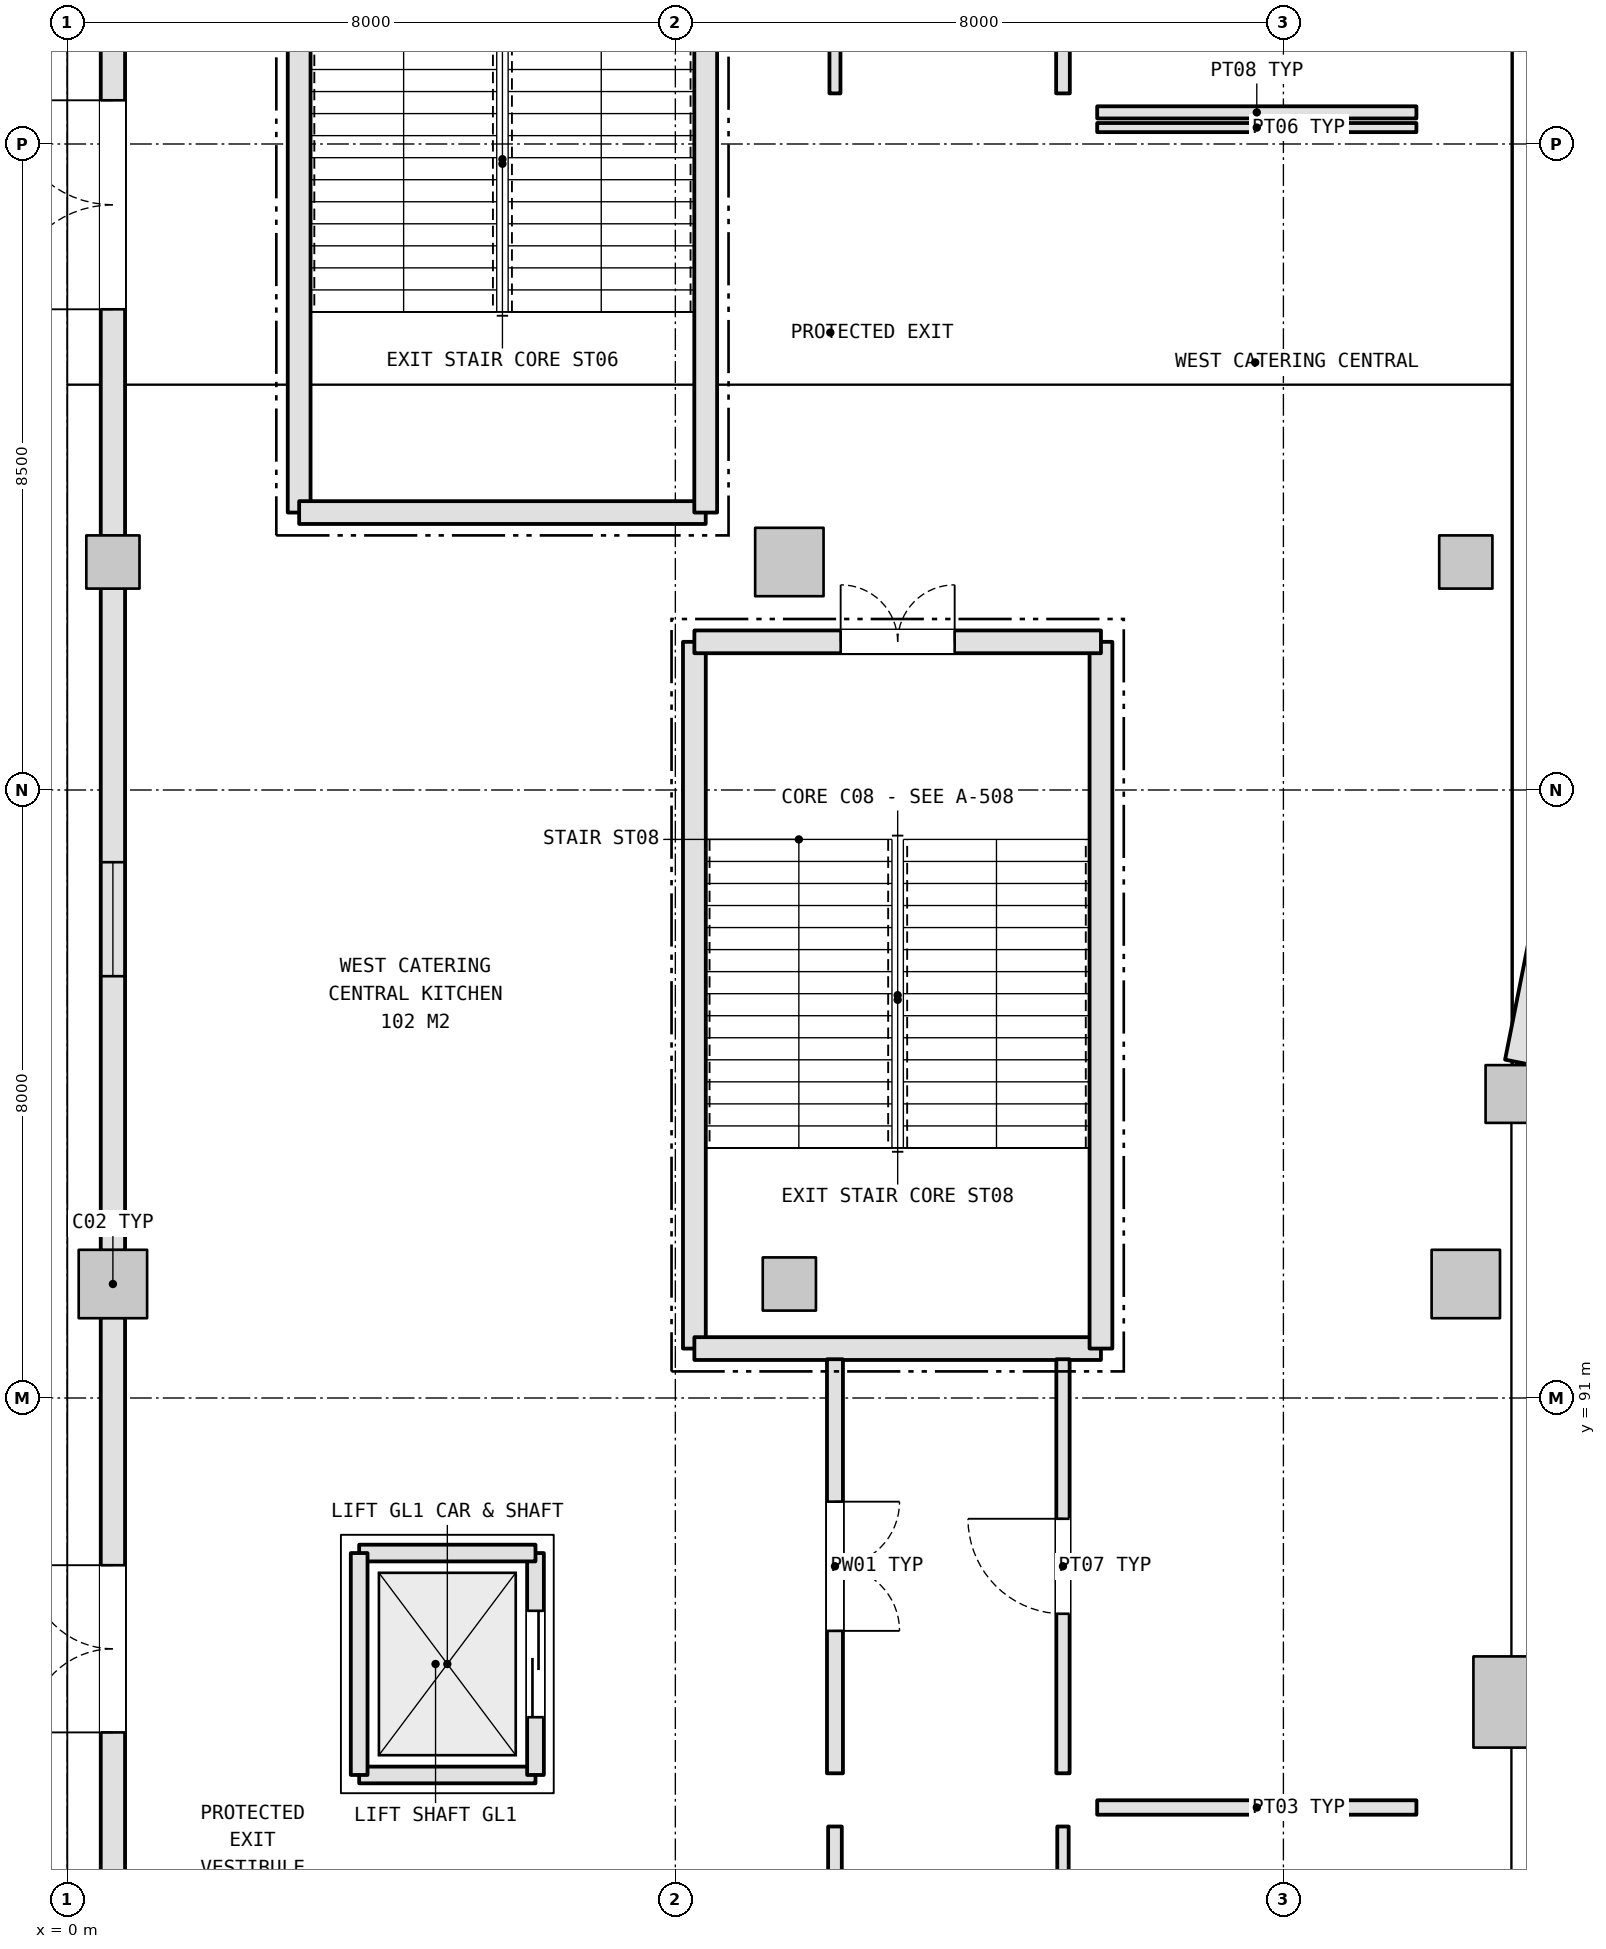
"""IFC4 building model, lengths in metres.
Left out: names, types, materials, properties, quantities, classifications, styles, units other than length and angle.
Written with IfcOpenShell. Run it as: python <this file> out.ifc"""

import sys

from ifc_helpers import new_model, si_unit, direction, frame, frame_2d, origin, origin_2d, place, context, subcontext, project, spatial, rectangle, extrude, element, fill, save


model = new_model("IFC4")
c1 = context("Model", 3, precision=1e-05, world=origin(), true_north=direction((0.0, 1.0)))
c2 = subcontext(c1, "Body", "Model", "MODEL_VIEW")
j1 = project(units=[si_unit("LENGTHUNIT", "METRE"), si_unit("PLANEANGLEUNIT", "RADIAN")], contexts=[c1])
p1 = place(None, origin())
s1 = spatial("IfcSite", under=j1, at=p1, CompositionType="ELEMENT")
p2 = place(p1, origin())
s2 = spatial("IfcBuilding", under=s1, at=p2, CompositionType="ELEMENT")
p3 = place(p2, origin())
s3 = spatial("IfcBuildingStorey", under=s2, at=p3, CompositionType="ELEMENT", Elevation=0.0)
p4 = place(p3, frame((19.0, 95.0, 0.0), z_axis=(0.0, 0.0, 1.0), x_axis=(1.0, 0.0, 0.0)))
e1 = element("IfcColumn", 1, at=p4, inside=s3, PredefinedType="COLUMN", context=c2, shape_type="SweptSolid", body=[
    extrude(rectangle(XDim=0.68, YDim=0.76, at=origin_2d()), origin(), (0.0, 0.0, 1.0), 5.4),
])
p5 = place(p3, frame((19.0, 87.0, 0.0), z_axis=(0.0, 0.0, 1.0), x_axis=(1.0, 0.0, 0.0)))
e2 = element("IfcColumn", 2, at=p5, inside=s3, PredefinedType="COLUMN", context=c2, shape_type="SweptSolid", body=[
    extrude(rectangle(XDim=1.0, YDim=1.2, at=origin_2d()), origin(), (0.0, 0.0, 1.0), 5.4),
])
p6 = place(p3, frame((0.6, 92.5, 0.0), z_axis=(0.0, 0.0, 1.0), x_axis=(1.0, 0.0, 0.0)))
e3 = element("IfcColumn", 3, at=p6, inside=s3, PredefinedType="COLUMN", context=c2, shape_type="SweptSolid", body=[
    extrude(rectangle(XDim=0.9, YDim=0.9, at=origin_2d()), origin(), (0.0, 0.0, 1.0), 5.4),
])
for number, where, z_axis, x_axis in (
    (4, (0.6, 102.0, 0.0), (0.0, 0.0, 1.0), (1.0, 0.0, 0.0)),
    (5, (9.5, 92.5, 0.0), (0.0, 0.0, 1.0), (1.0, 0.0, 0.0)),
):
    element("IfcColumn", number, at=place(p3, frame(where, z_axis=z_axis, x_axis=x_axis)), inside=s3, PredefinedType="COLUMN", context=c2, shape_type="SweptSolid", body=[
        extrude(rectangle(XDim=0.7, YDim=0.7, at=origin_2d()), origin(), (0.0, 0.0, 1.0), 5.4),
    ])
for number, where, z_axis, x_axis in (
    (6, (9.5, 102.0, 0.0), (0.0, 0.0, 1.0), (1.0, 0.0, 0.0)),
    (7, (18.4, 92.5, 0.0), (0.0, 0.0, 1.0), (1.0, 0.0, 0.0)),
):
    element("IfcColumn", number, at=place(p3, frame(where, z_axis=z_axis, x_axis=x_axis)), inside=s3, PredefinedType="COLUMN", context=c2, shape_type="SweptSolid", body=[
        extrude(rectangle(XDim=0.9, YDim=0.9, at=origin_2d()), origin(), (0.0, 0.0, 1.0), 5.4),
    ])
p7 = place(p3, frame((18.4, 102.0, 0.0), z_axis=(0.0, 0.0, 1.0), x_axis=(1.0, 0.0, 0.0)))
e8 = element("IfcColumn", 8, at=p7, inside=s3, PredefinedType="COLUMN", context=c2, shape_type="SweptSolid", body=[
    extrude(rectangle(XDim=0.7, YDim=0.7, at=origin_2d()), origin(), (0.0, 0.0, 1.0), 5.4),
])
p8 = place(p3, frame((22.827, 114.239, 0.0), z_axis=(0.0, 0.0, 1.0), x_axis=(-0.19509817024, -0.980783719262, 0.0)))
e9 = element("IfcWall", 9, at=p8, inside=s3, PredefinedType="SOLIDWALL", context=c2, shape_type="SweptSolid", body=[
    extrude(rectangle(XDim=19.188, YDim=0.34, at=frame_2d((9.594, 0.0))), origin(), (0.0, 0.0, 1.0), 4.275),
])
p9 = place(p8, frame((8.794, 0.0, 2.4)))
e10 = element("IfcOpeningElement", 10, at=p9, cuts=e9, PredefinedType="OPENING", context=c2, shape_type="SweptSolid", body=[
    extrude(rectangle(XDim=1.6, YDim=1.2, at=frame_2d((0.8, 0.6))), frame((0.0, 0.18, 0.0), z_axis=(0.0, -1.0, 0.0), x_axis=(1.0, 0.0, 0.0)), (0.0, 0.0, 1.0), 0.36),
])
p10 = place(p3, frame((0.6, 83.338, 0.0), z_axis=(0.0, 0.0, 1.0), x_axis=(0.0, 1.0, 0.0)))
e11 = element("IfcWall", 11, at=p10, inside=s3, PredefinedType="SOLIDWALL", context=c2, shape_type="SweptSolid", body=[
    extrude(rectangle(XDim=8.724, YDim=0.32, at=frame_2d((4.362, 0.0))), origin(), (0.0, 0.0, 1.0), 4.475),
])
p11 = place(p10, frame((3.262, 0.0, 0.0)))
e12 = element("IfcOpeningElement", 12, at=p11, cuts=e11, PredefinedType="OPENING", context=c2, shape_type="SweptSolid", body=[
    extrude(rectangle(XDim=2.2, YDim=2.4, at=frame_2d((1.1, 1.2))), frame((0.0, 0.17, 0.0), z_axis=(0.0, -1.0, 0.0), x_axis=(1.0, 0.0, 0.0)), (0.0, 0.0, 1.0), 0.34),
])
p12 = place(p3, frame((0.6, 92.938, 0.0), z_axis=(0.0, 0.0, 1.0), x_axis=(0.0, 1.0, 0.0)))
e13 = element("IfcWall", 13, at=p12, inside=s3, PredefinedType="SOLIDWALL", context=c2, shape_type="SweptSolid", body=[
    extrude(rectangle(XDim=8.724, YDim=0.32, at=frame_2d((4.362, 0.0))), origin(), (0.0, 0.0, 1.0), 4.475),
])
p13 = place(p12, frame((3.612, 0.0, 1.05)))
e14 = element("IfcOpeningElement", 14, at=p13, cuts=e13, PredefinedType="OPENING", context=c2, shape_type="SweptSolid", body=[
    extrude(rectangle(XDim=1.5, YDim=1.5, at=frame_2d((0.75, 0.75))), frame((0.0, 0.17, 0.0), z_axis=(0.0, -1.0, 0.0), x_axis=(1.0, 0.0, 0.0)), (0.0, 0.0, 1.0), 0.34),
])
p14 = place(p3, frame((0.6, 102.338, 0.0), z_axis=(0.0, 0.0, 1.0), x_axis=(0.0, 1.0, 0.0)))
e15 = element("IfcWall", 15, at=p14, inside=s3, PredefinedType="SOLIDWALL", context=c2, shape_type="SweptSolid", body=[
    extrude(rectangle(XDim=8.724, YDim=0.32, at=frame_2d((4.362, 0.0))), origin(), (0.0, 0.0, 1.0), 4.475),
])
p15 = place(p14, frame((2.987, 0.0, 0.0)))
e16 = element("IfcOpeningElement", 16, at=p15, cuts=e15, PredefinedType="OPENING", context=c2, shape_type="SweptSolid", body=[
    extrude(rectangle(XDim=2.75, YDim=2.4, at=frame_2d((1.375, 1.2))), frame((0.0, 0.17, 0.0), z_axis=(0.0, -1.0, 0.0), x_axis=(1.0, 0.0, 0.0)), (0.0, 0.0, 1.0), 0.34),
])
p16 = place(p3, frame((3.05, 111.95, 0.0), z_axis=(0.0, 0.0, 1.0), x_axis=(0.0, -1.0, 0.0)))
e17 = element("IfcWall", 17, at=p16, inside=s3, PredefinedType="SHEAR", context=c2, shape_type="SweptSolid", body=[
    extrude(rectangle(XDim=9.299, YDim=0.3, at=frame_2d((4.65, 0.0))), origin(), (0.0, 0.0, 1.0), 5.14),
])
p17 = place(p3, frame((3.05, 102.65, 0.0), z_axis=(0.0, 0.0, 1.0), x_axis=(1.0, 0.0, 0.0)))
e18 = element("IfcWall", 18, at=p17, inside=s3, PredefinedType="SHEAR", context=c2, shape_type="SweptSolid", body=[
    extrude(rectangle(XDim=5.349, YDim=0.3, at=frame_2d((2.675, 0.0))), origin(), (0.0, 0.0, 1.0), 5.14),
])
for number, where, z_axis, x_axis in (
    (19, (8.4, 102.65, 0.0), (0.0, 0.0, 1.0), (0.0, 1.0, 0.0)),
    (20, (8.25, 100.95, 0.0), (0.0, 0.0, 1.0), (0.0, -1.0, 0.0)),
):
    element("IfcWall", number, at=place(p3, frame(where, z_axis=z_axis, x_axis=x_axis)), inside=s3, PredefinedType="SHEAR", context=c2, shape_type="SweptSolid", body=[
        extrude(rectangle(XDim=9.299, YDim=0.3, at=frame_2d((4.65, 0.0))), origin(), (0.0, 0.0, 1.0), 5.14),
    ])
p18 = place(p3, frame((8.25, 91.65, 0.0), z_axis=(0.0, 0.0, 1.0), x_axis=(1.0, 0.0, 0.0)))
e21 = element("IfcWall", 21, at=p18, inside=s3, PredefinedType="SHEAR", context=c2, shape_type="SweptSolid", body=[
    extrude(rectangle(XDim=5.349, YDim=0.3, at=frame_2d((2.675, 0.0))), origin(), (0.0, 0.0, 1.0), 5.14),
])
p19 = place(p3, frame((13.6, 91.65, 0.0), z_axis=(0.0, 0.0, 1.0), x_axis=(0.0, 1.0, 0.0)))
e22 = element("IfcWall", 22, at=p19, inside=s3, PredefinedType="SHEAR", context=c2, shape_type="SweptSolid", body=[
    extrude(rectangle(XDim=9.299, YDim=0.3, at=frame_2d((4.65, 0.0))), origin(), (0.0, 0.0, 1.0), 5.14),
])
p20 = place(p3, frame((13.6, 100.95, 0.0), z_axis=(0.0, 0.0, 1.0), x_axis=(-1.0, 0.0, 0.0)))
e23 = element("IfcWall", 23, at=p20, inside=s3, PredefinedType="SHEAR", context=c2, shape_type="SweptSolid", body=[
    extrude(rectangle(XDim=5.349, YDim=0.3, at=frame_2d((2.675, 0.0))), origin(), (0.0, 0.0, 1.0), 5.14),
])
p21 = place(p20, frame((1.925, 0.0, 0.0)))
e24 = element("IfcOpeningElement", 24, at=p21, cuts=e23, PredefinedType="OPENING", context=c2, shape_type="SweptSolid", body=[
    extrude(rectangle(XDim=1.5, YDim=2.2, at=frame_2d((0.75, 1.1))), frame((0.0, 0.16, 0.0), z_axis=(0.0, -1.0, 0.0), x_axis=(1.0, 0.0, 0.0)), (0.0, 0.0, 1.0), 0.32),
])
p22 = place(p3, frame((3.84, 86.04, -1.1), z_axis=(0.0, 0.0, 1.0), x_axis=(1.0, 0.0, 0.0)))
e25 = element("IfcWall", 25, at=p22, inside=s3, PredefinedType="SHEAR", context=c2, shape_type="SweptSolid", body=[
    extrude(rectangle(XDim=2.32, YDim=0.22, at=frame_2d((1.16, 0.0))), origin(), (0.0, 0.0, 1.0), 6.24),
])
p23 = place(p3, frame((6.16, 86.04, -1.1), z_axis=(0.0, 0.0, 1.0), x_axis=(0.0, 1.0, 0.0)))
e26 = element("IfcWall", 26, at=p23, inside=s3, PredefinedType="SHEAR", context=c2, shape_type="SweptSolid", body=[
    extrude(rectangle(XDim=2.92, YDim=0.22, at=frame_2d((1.46, 0.0))), origin(), (0.0, 0.0, 1.0), 6.24),
])
p24 = place(p23, frame((0.76, 0.0, 1.1)))
e27 = element("IfcOpeningElement", 27, at=p24, cuts=e26, PredefinedType="OPENING", context=c2, shape_type="SweptSolid", body=[
    extrude(rectangle(XDim=1.4, YDim=2.3, at=frame_2d((0.7, 1.15))), frame((0.0, 0.12, 0.0), z_axis=(0.0, -1.0, 0.0), x_axis=(1.0, 0.0, 0.0)), (0.0, 0.0, 1.0), 0.24),
])
p25 = place(p3, frame((6.16, 88.96, -1.1), z_axis=(0.0, 0.0, 1.0), x_axis=(-1.0, 0.0, 0.0)))
e28 = element("IfcWall", 28, at=p25, inside=s3, PredefinedType="SHEAR", context=c2, shape_type="SweptSolid", body=[
    extrude(rectangle(XDim=2.32, YDim=0.22, at=frame_2d((1.16, 0.0))), origin(), (0.0, 0.0, 1.0), 6.24),
])
p26 = place(p3, frame((3.84, 88.96, -1.1), z_axis=(0.0, 0.0, 1.0), x_axis=(0.0, -1.0, 0.0)))
e29 = element("IfcWall", 29, at=p26, inside=s3, PredefinedType="SHEAR", context=c2, shape_type="SweptSolid", body=[
    extrude(rectangle(XDim=2.92, YDim=0.22, at=frame_2d((1.46, 0.0))), origin(), (0.0, 0.0, 1.0), 6.24),
])
p27 = place(p3, frame((10.1, 85.362, 0.0), z_axis=(0.0, 0.0, 1.0), x_axis=(0.0, -1.0, 0.0)))
e30 = element("IfcWall", 30, at=p27, inside=s3, PredefinedType="PARTITIONING", context=c2, shape_type="SweptSolid", body=[
    extrude(rectangle(XDim=15.376, YDim=0.18, at=frame_2d((7.688, 0.0))), origin(), (0.0, 0.0, 1.0), 4.668),
])
p28 = place(p27, frame((7.213, 0.0, 0.0)))
e31 = element("IfcOpeningElement", 31, at=p28, cuts=e30, PredefinedType="OPENING", context=c2, shape_type="SweptSolid", body=[
    extrude(rectangle(XDim=0.95, YDim=2.15, at=frame_2d((0.475, 1.075))), frame((0.0, 0.1, 0.0), z_axis=(0.0, -1.0, 0.0), x_axis=(1.0, 0.0, 0.0)), (0.0, 0.0, 1.0), 0.2),
])
p29 = place(p3, frame((13.1, 69.986, 0.0), z_axis=(0.0, 0.0, 1.0), x_axis=(0.0, 1.0, 0.0)))
e32 = element("IfcWall", 32, at=p29, inside=s3, PredefinedType="PARTITIONING", context=c2, shape_type="SweptSolid", body=[
    extrude(rectangle(XDim=15.376, YDim=0.15, at=frame_2d((7.688, 0.0))), origin(), (0.0, 0.0, 1.0), 4.668),
])
p30 = place(p29, frame((7.138, 0.0, 0.0)))
e33 = element("IfcOpeningElement", 33, at=p30, cuts=e32, PredefinedType="OPENING", context=c2, shape_type="SweptSolid", body=[
    extrude(rectangle(XDim=1.1, YDim=2.15, at=frame_2d((0.55, 1.075))), frame((0.0, 0.085, 0.0), z_axis=(0.0, -1.0, 0.0), x_axis=(1.0, 0.0, 0.0)), (0.0, 0.0, 1.0), 0.17),
])
p31 = place(p3, frame((13.55, 85.612, 0.0), z_axis=(0.0, 0.0, 1.0), x_axis=(1.0, 0.0, 0.0)))
e34 = element("IfcWall", 34, at=p31, inside=s3, PredefinedType="PARTITIONING", context=c2, shape_type="SweptSolid", body=[
    extrude(rectangle(XDim=4.2, YDim=0.19, at=frame_2d((2.1, 0.0))), origin(), (0.0, 0.0, 1.0), 5.12),
])
p32 = place(p3, frame((10.1, 91.51, 0.0), z_axis=(0.0, 0.0, 1.0), x_axis=(0.0, -1.0, 0.0)))
e35 = element("IfcWall", 35, at=p32, inside=s3, PredefinedType="PLUMBINGWALL", context=c2, shape_type="SweptSolid", body=[
    extrude(rectangle(XDim=5.448, YDim=0.21, at=frame_2d((2.724, 0.0))), origin(), (0.0, 0.0, 1.0), 5.12),
])
p33 = place(p32, frame((1.874, 0.0, 0.0)))
e36 = element("IfcOpeningElement", 36, at=p33, cuts=e35, PredefinedType="OPENING", context=c2, shape_type="SweptSolid", body=[
    extrude(rectangle(XDim=1.7, YDim=2.25, at=frame_2d((0.85, 1.125))), frame((0.0, 0.115, 0.0), z_axis=(0.0, -1.0, 0.0), x_axis=(1.0, 0.0, 0.0)), (0.0, 0.0, 1.0), 0.23),
])
p34 = place(p3, frame((13.1, 86.062, 0.0), z_axis=(0.0, 0.0, 1.0), x_axis=(0.0, 1.0, 0.0)))
e37 = element("IfcWall", 37, at=p34, inside=s3, PredefinedType="PARTITIONING", context=c2, shape_type="SweptSolid", body=[
    extrude(rectangle(XDim=5.448, YDim=0.175, at=frame_2d((2.724, 0.0))), origin(), (0.0, 0.0, 1.0), 5.12),
])
p35 = place(p34, frame((2.099, 0.0, 0.0)))
e38 = element("IfcOpeningElement", 38, at=p35, cuts=e37, PredefinedType="OPENING", context=c2, shape_type="SweptSolid", body=[
    extrude(rectangle(XDim=1.25, YDim=2.2, at=frame_2d((0.625, 1.1))), frame((0.0, 0.097, 0.0), z_axis=(0.0, -1.0, 0.0), x_axis=(1.0, 0.0, 0.0)), (0.0, 0.0, 1.0), 0.195),
])
p36 = place(p3, frame((13.55, 107.716, 0.0), z_axis=(0.0, 0.0, 1.0), x_axis=(1.0, 0.0, 0.0)))
e39 = element("IfcWall", 39, at=p36, inside=s3, PredefinedType="PARTITIONING", context=c2, shape_type="SweptSolid", body=[
    extrude(rectangle(XDim=4.2, YDim=0.12, at=frame_2d((2.1, 0.0))), origin(), (0.0, 0.0, 1.0), 5.12),
])
p37 = place(p3, frame((10.1, 121.532, 0.0), z_axis=(0.0, 0.0, 1.0), x_axis=(0.0, -1.0, 0.0)))
e40 = element("IfcWall", 40, at=p37, inside=s3, PredefinedType="PARTITIONING", context=c2, shape_type="SweptSolid", body=[
    extrude(rectangle(XDim=13.366, YDim=0.145, at=frame_2d((6.683, 0.0))), origin(), (0.0, 0.0, 1.0), 4.668),
])
p38 = place(p37, frame((5.908, 0.0, 0.0)))
e41 = element("IfcOpeningElement", 41, at=p38, cuts=e40, PredefinedType="OPENING", context=c2, shape_type="SweptSolid", body=[
    extrude(rectangle(XDim=1.55, YDim=2.15, at=frame_2d((0.775, 1.075))), frame((0.0, 0.083, 0.0), z_axis=(0.0, -1.0, 0.0), x_axis=(1.0, 0.0, 0.0)), (0.0, 0.0, 1.0), 0.165),
])
p39 = place(p3, frame((13.1, 108.166, 0.0), z_axis=(0.0, 0.0, 1.0), x_axis=(0.0, 1.0, 0.0)))
e42 = element("IfcWall", 42, at=p39, inside=s3, PredefinedType="PARTITIONING", context=c2, shape_type="SweptSolid", body=[
    extrude(rectangle(XDim=4.344, YDim=0.18, at=frame_2d((2.172, 0.0))), origin(), (0.0, 0.0, 1.0), 4.668),
])
p40 = place(p39, frame((1.692, 0.0, 0.0)))
e43 = element("IfcOpeningElement", 43, at=p40, cuts=e42, PredefinedType="OPENING", context=c2, shape_type="SweptSolid", body=[
    extrude(rectangle(XDim=0.96, YDim=2.15, at=frame_2d((0.48, 1.075))), frame((0.0, 0.1, 0.0), z_axis=(0.0, -1.0, 0.0), x_axis=(1.0, 0.0, 0.0)), (0.0, 0.0, 1.0), 0.2),
])
p41 = place(p3, frame((17.75, 107.916, 0.0), z_axis=(0.0, 0.0, 1.0), x_axis=(-1.0, 0.0, 0.0)))
e44 = element("IfcWall", 44, at=p41, inside=s3, PredefinedType="PARTITIONING", context=c2, shape_type="SweptSolid", body=[
    extrude(rectangle(XDim=4.2, YDim=0.16, at=frame_2d((2.1, 0.0))), origin(), (0.0, 0.0, 1.0), 5.12),
])
p42 = place(p11, origin())
e45 = element("IfcDoor", 45, at=p42, inside=s3, OperationType="DOUBLE_DOOR_SINGLE_SWING", PredefinedType="DOOR", context=c2, shape_type="SweptSolid", body=[
    extrude(rectangle(XDim=2.2, YDim=2.4, at=frame_2d((1.1, 1.2))), frame((0.0, 0.025, 0.0), z_axis=(0.0, -1.0, 0.0), x_axis=(1.0, 0.0, 0.0)), (0.0, 0.0, 1.0), 0.05),
])
fill(e12, e45)
p43 = place(p13, origin())
e46 = element("IfcWindow", 46, at=p43, inside=s3, PartitioningType="SINGLE_PANEL", PredefinedType="WINDOW", context=c2, shape_type="SweptSolid", body=[
    extrude(rectangle(XDim=1.5, YDim=1.5, at=frame_2d((0.75, 0.75))), frame((0.0, 0.03, 0.0), z_axis=(0.0, -1.0, 0.0), x_axis=(1.0, 0.0, 0.0)), (0.0, 0.0, 1.0), 0.06),
])
fill(e14, e46)
p44 = place(p15, origin())
e47 = element("IfcDoor", 47, at=p44, inside=s3, OperationType="DOUBLE_DOOR_SINGLE_SWING", PredefinedType="DOOR", context=c2, shape_type="SweptSolid", body=[
    extrude(rectangle(XDim=2.75, YDim=2.4, at=frame_2d((1.375, 1.2))), frame((0.0, 0.025, 0.0), z_axis=(0.0, -1.0, 0.0), x_axis=(1.0, 0.0, 0.0)), (0.0, 0.0, 1.0), 0.05),
])
fill(e16, e47)
p45 = place(p21, frame((1.5, 0.0, 0.0), z_axis=(0.0, 0.0, 1.0), x_axis=(-1.0, 0.0, 0.0)))
e48 = element("IfcDoor", 48, at=p45, inside=s3, OperationType="DOUBLE_DOOR_SINGLE_SWING", PredefinedType="DOOR", context=c2, shape_type="SweptSolid", body=[
    extrude(rectangle(XDim=1.5, YDim=2.2, at=frame_2d((0.75, 1.1))), frame((0.0, 0.025, 0.0), z_axis=(0.0, -1.0, 0.0), x_axis=(1.0, 0.0, 0.0)), (0.0, 0.0, 1.0), 0.05),
])
fill(e24, e48)
p46 = place(p24, origin())
e49 = element("IfcDoor", 49, at=p46, inside=s3, OperationType="DOUBLE_DOOR_SLIDING", PredefinedType="DOOR", context=c2, shape_type="SweptSolid", body=[
    extrude(rectangle(XDim=1.4, YDim=2.3, at=frame_2d((0.7, 1.15))), frame((0.0, 0.025, 0.0), z_axis=(0.0, -1.0, 0.0), x_axis=(1.0, 0.0, 0.0)), (0.0, 0.0, 1.0), 0.05),
])
fill(e27, e49)
p47 = place(p33, origin())
e50 = element("IfcDoor", 50, at=p47, inside=s3, OperationType="DOUBLE_DOOR_SINGLE_SWING", PredefinedType="DOOR", context=c2, shape_type="SweptSolid", body=[
    extrude(rectangle(XDim=1.7, YDim=2.25, at=frame_2d((0.85, 1.125))), frame((0.0, 0.025, 0.0), z_axis=(0.0, -1.0, 0.0), x_axis=(1.0, 0.0, 0.0)), (0.0, 0.0, 1.0), 0.05),
])
fill(e36, e50)
p48 = place(p35, origin())
e51 = element("IfcDoor", 51, at=p48, inside=s3, OperationType="SINGLE_SWING_RIGHT", PredefinedType="DOOR", context=c2, shape_type="SweptSolid", body=[
    extrude(rectangle(XDim=1.25, YDim=2.2, at=frame_2d((0.625, 1.1))), frame((0.0, 0.025, 0.0), z_axis=(0.0, -1.0, 0.0), x_axis=(1.0, 0.0, 0.0)), (0.0, 0.0, 1.0), 0.05),
])
fill(e38, e51)
save(model, sys.argv[1])
